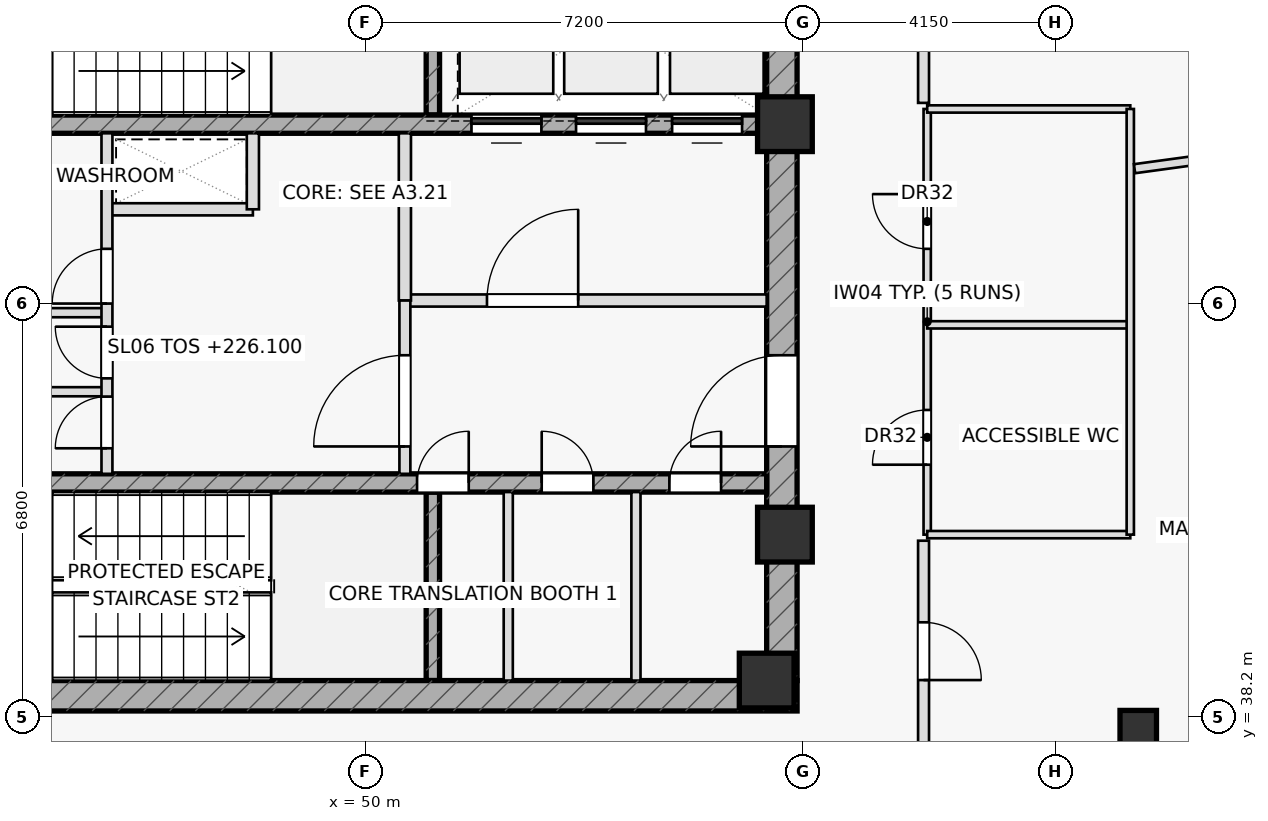
"""IFC4 building model, lengths in metres.
Left out: names, types, materials, properties, quantities, classifications, styles, units other than length and angle.
Written with IfcOpenShell. Run it as: python <this file> out.ifc"""

import sys

from ifc_helpers import new_model, si_unit, direction, frame, frame_2d, origin, origin_2d, place, context, subcontext, project, spatial, rectangle, hollow_rectangle, extrude, element, fill, save


model = new_model("IFC4")
c1 = context("Model", 3, precision=1e-05, world=origin(), true_north=direction((0.0, 1.0)))
c2 = subcontext(c1, "Body", "Model", "MODEL_VIEW")
j1 = project(units=[si_unit("LENGTHUNIT", "METRE"), si_unit("PLANEANGLEUNIT", "RADIAN")], contexts=[c1])
p1 = place(None, origin())
s1 = spatial("IfcSite", under=j1, at=p1, CompositionType="ELEMENT")
p2 = place(p1, origin())
s2 = spatial("IfcBuilding", under=s1, at=p2, CompositionType="ELEMENT")
p3 = place(p2, frame((0.0, 0.0, 226.1)))
s3 = spatial("IfcBuildingStorey", under=s2, at=p3, CompositionType="ELEMENT", Elevation=226.1)
for number, where, z_axis, x_axis in (
    (1, (51.11, 48.1, 0.0), (0.0, 0.0, 1.0), (0.0, 1.0, 0.0)),
    (2, (51.11, 38.8, 0.0), (0.0, 0.0, 1.0), (0.0, 1.0, 0.0)),
):
    element("IfcWall", number, at=place(p3, frame(where, z_axis=z_axis, x_axis=x_axis)), inside=s3, PredefinedType="SHEAR", context=c2, shape_type="SweptSolid", body=[
        extrude(rectangle(XDim=3.1, YDim=0.22, at=frame_2d((1.55, 0.0))), origin(), (0.0, 0.0, 1.0), 3.65),
    ])
p4 = place(p3, frame((42.9, 38.55, 0.0), z_axis=(0.0, 0.0, 1.0), x_axis=(1.0, 0.0, 0.0)))
e3 = element("IfcWall", 3, at=p4, inside=s3, PredefinedType="SHEAR", context=c2, shape_type="SweptSolid", body=[
    extrude(rectangle(XDim=14.2, YDim=0.5, at=frame_2d((7.1, 0.0))), origin(), (0.0, 0.0, 1.0), 3.65),
])
p5 = place(p4, frame((0.78, 0.0, 0.0)))
e4 = element("IfcOpeningElement", 4, at=p5, cuts=e3, PredefinedType="OPENING", context=c2, shape_type="SweptSolid", body=[
    extrude(rectangle(XDim=1.05, YDim=2.2, at=frame_2d((0.525, 1.1))), frame((0.0, 0.26, 0.0), z_axis=(0.0, -1.0, 0.0), x_axis=(1.0, 0.0, 0.0)), (0.0, 0.0, 1.0), 0.52),
])
p6 = place(p3, frame((56.85, 38.8, 0.0), z_axis=(0.0, 0.0, 1.0), x_axis=(0.0, 1.0, 0.0)))
e5 = element("IfcWall", 5, at=p6, inside=s3, PredefinedType="SHEAR", context=c2, shape_type="SweptSolid", body=[
    extrude(rectangle(XDim=12.4, YDim=0.5, at=frame_2d((6.2, 0.0))), origin(), (0.0, 0.0, 1.0), 3.65),
])
p7 = place(p6, frame((3.85, 0.0, 0.0)))
e6 = element("IfcOpeningElement", 6, at=p7, cuts=e5, PredefinedType="OPENING", context=c2, shape_type="SweptSolid", body=[
    extrude(rectangle(XDim=1.5, YDim=2.2, at=frame_2d((0.75, 1.1))), frame((0.0, 0.26, 0.0), z_axis=(0.0, -1.0, 0.0), x_axis=(1.0, 0.0, 0.0)), (0.0, 0.0, 1.0), 0.52),
])
p8 = place(p3, frame((43.4, 47.95, 0.0), z_axis=(0.0, 0.0, 1.0), x_axis=(1.0, 0.0, 0.0)))
e7 = element("IfcWall", 7, at=p8, inside=s3, PredefinedType="SHEAR", context=c2, shape_type="SweptSolid", body=[
    extrude(rectangle(XDim=13.2, YDim=0.3, at=frame_2d((6.6, 0.0))), origin(), (0.0, 0.0, 1.0), 3.65),
])
p9 = place(p8, frame((8.345, 0.0, 0.0)))
e8 = element("IfcOpeningElement", 8, at=p9, cuts=e7, PredefinedType="OPENING", context=c2, shape_type="SweptSolid", body=[
    extrude(rectangle(XDim=1.15, YDim=2.2, at=frame_2d((0.575, 1.1))), frame((0.0, 0.16, 0.0), z_axis=(0.0, -1.0, 0.0), x_axis=(1.0, 0.0, 0.0)), (0.0, 0.0, 1.0), 0.32),
])
p10 = place(p8, frame((10.065, 0.0, 0.0)))
e9 = element("IfcOpeningElement", 9, at=p10, cuts=e7, PredefinedType="OPENING", context=c2, shape_type="SweptSolid", body=[
    extrude(rectangle(XDim=1.15, YDim=2.2, at=frame_2d((0.575, 1.1))), frame((0.0, 0.16, 0.0), z_axis=(0.0, -1.0, 0.0), x_axis=(1.0, 0.0, 0.0)), (0.0, 0.0, 1.0), 0.32),
])
p11 = place(p8, frame((11.645, 0.0, 0.0)))
e10 = element("IfcOpeningElement", 10, at=p11, cuts=e7, PredefinedType="OPENING", context=c2, shape_type="SweptSolid", body=[
    extrude(rectangle(XDim=1.15, YDim=2.2, at=frame_2d((0.575, 1.1))), frame((0.0, 0.16, 0.0), z_axis=(0.0, -1.0, 0.0), x_axis=(1.0, 0.0, 0.0)), (0.0, 0.0, 1.0), 0.32),
])
p12 = place(p3, frame((43.4, 42.05, 0.0), z_axis=(0.0, 0.0, 1.0), x_axis=(1.0, 0.0, 0.0)))
e11 = element("IfcWall", 11, at=p12, inside=s3, PredefinedType="SHEAR", context=c2, shape_type="SweptSolid", body=[
    extrude(rectangle(XDim=13.2, YDim=0.3, at=frame_2d((6.6, 0.0))), origin(), (0.0, 0.0, 1.0), 3.65),
])
p13 = place(p12, frame((7.45, 0.0, 0.0)))
e12 = element("IfcOpeningElement", 12, at=p13, cuts=e11, PredefinedType="OPENING", context=c2, shape_type="SweptSolid", body=[
    extrude(rectangle(XDim=0.85, YDim=2.05, at=frame_2d((0.425, 1.025))), frame((0.0, 0.16, 0.0), z_axis=(0.0, -1.0, 0.0), x_axis=(1.0, 0.0, 0.0)), (0.0, 0.0, 1.0), 0.32),
])
p14 = place(p12, frame((9.5, 0.0, 0.0)))
e13 = element("IfcOpeningElement", 13, at=p14, cuts=e11, PredefinedType="OPENING", context=c2, shape_type="SweptSolid", body=[
    extrude(rectangle(XDim=0.85, YDim=2.05, at=frame_2d((0.425, 1.025))), frame((0.0, 0.16, 0.0), z_axis=(0.0, -1.0, 0.0), x_axis=(1.0, 0.0, 0.0)), (0.0, 0.0, 1.0), 0.32),
])
p15 = place(p12, frame((11.6, 0.0, 0.0)))
e14 = element("IfcOpeningElement", 14, at=p15, cuts=e11, PredefinedType="OPENING", context=c2, shape_type="SweptSolid", body=[
    extrude(rectangle(XDim=0.85, YDim=2.05, at=frame_2d((0.425, 1.025))), frame((0.0, 0.16, 0.0), z_axis=(0.0, -1.0, 0.0), x_axis=(1.0, 0.0, 0.0)), (0.0, 0.0, 1.0), 0.32),
])
for number, where, z_axis, x_axis in (
    (15, (56.9, 47.95, 0.0), (0.0, 0.0, 1.0), (1.0, 0.0, 0.0)),
    (16, (56.9, 41.2, 0.0), (0.0, 0.0, 1.0), (1.0, 0.0, 0.0)),
    (17, (56.6, 38.8, 0.0), (0.0, 0.0, 1.0), (1.0, 0.0, 0.0)),
):
    element("IfcColumn", number, at=place(p3, frame(where, z_axis=z_axis, x_axis=x_axis)), inside=s3, PredefinedType="COLUMN", context=c2, shape_type="SweptSolid", body=[
        extrude(rectangle(XDim=0.9, YDim=0.9, at=origin_2d()), origin(), (0.0, 0.0, 1.0), 3.65),
    ])
p16 = place(p3, frame((62.711, 38.009, 0.0), z_axis=(0.0, 0.0, 1.0), x_axis=(1.0, 0.0, 0.0)))
e18 = element("IfcColumn", 18, at=p16, inside=s3, PredefinedType="COLUMN", context=c2, shape_type="SweptSolid", body=[
    extrude(hollow_rectangle(XDim=0.6, YDim=0.6, WallThickness=0.036, at=origin_2d()), origin(), (0.0, 0.0, 1.0), 3.65),
])
p17 = place(p3, frame((45.75, 46.55, 0.0), z_axis=(0.0, 0.0, 1.0), x_axis=(1.0, 0.0, 0.0)))
e19 = element("IfcWall", 19, at=p17, inside=s3, PredefinedType="PARTITIONING", context=c2, shape_type="SweptSolid", body=[
    extrude(rectangle(XDim=2.4, YDim=0.2, at=frame_2d((1.2, 0.0))), origin(), (0.0, 0.0, 1.0), 3.65),
])
p18 = place(p3, frame((48.15, 46.55, 0.0), z_axis=(0.0, 0.0, 1.0), x_axis=(0.0, 1.0, 0.0)))
e20 = element("IfcWall", 20, at=p18, inside=s3, PredefinedType="PARTITIONING", context=c2, shape_type="SweptSolid", body=[
    extrude(rectangle(XDim=1.25, YDim=0.2, at=frame_2d((0.625, 0.0))), origin(), (0.0, 0.0, 1.0), 3.65),
])
p19 = place(p3, frame((50.65, 45.05, 0.0), z_axis=(0.0, 0.0, 1.0), x_axis=(1.0, 0.0, 0.0)))
e21 = element("IfcWall", 21, at=p19, inside=s3, PredefinedType="PARTITIONING", context=c2, shape_type="SweptSolid", body=[
    extrude(rectangle(XDim=5.95, YDim=0.2, at=frame_2d((2.975, 0.0))), origin(), (0.0, 0.0, 1.0), 3.65),
])
p20 = place(p19, frame((1.35, 0.0, 0.0)))
e22 = element("IfcOpeningElement", 22, at=p20, cuts=e21, PredefinedType="OPENING", context=c2, shape_type="SweptSolid", body=[
    extrude(rectangle(XDim=1.5, YDim=2.2, at=frame_2d((0.75, 1.1))), frame((0.0, 0.11, 0.0), z_axis=(0.0, -1.0, 0.0), x_axis=(1.0, 0.0, 0.0)), (0.0, 0.0, 1.0), 0.22),
])
p21 = place(p3, frame((50.65, 45.05, 0.0), z_axis=(0.0, 0.0, 1.0), x_axis=(0.0, 1.0, 0.0)))
e23 = element("IfcWall", 23, at=p21, inside=s3, PredefinedType="PARTITIONING", context=c2, shape_type="SweptSolid", body=[
    extrude(rectangle(XDim=2.75, YDim=0.2, at=frame_2d((1.375, 0.0))), origin(), (0.0, 0.0, 1.0), 3.65),
])
p22 = place(p3, frame((50.65, 42.2, 0.0), z_axis=(0.0, 0.0, 1.0), x_axis=(0.0, 1.0, 0.0)))
e24 = element("IfcWall", 24, at=p22, inside=s3, PredefinedType="PARTITIONING", context=c2, shape_type="SweptSolid", body=[
    extrude(rectangle(XDim=2.85, YDim=0.18, at=frame_2d((1.425, 0.0))), origin(), (0.0, 0.0, 1.0), 3.65),
])
p23 = place(p22, frame((0.45, 0.0, 0.0)))
e25 = element("IfcOpeningElement", 25, at=p23, cuts=e24, PredefinedType="OPENING", context=c2, shape_type="SweptSolid", body=[
    extrude(rectangle(XDim=1.5, YDim=2.2, at=frame_2d((0.75, 1.1))), frame((0.0, 0.1, 0.0), z_axis=(0.0, -1.0, 0.0), x_axis=(1.0, 0.0, 0.0)), (0.0, 0.0, 1.0), 0.2),
])
for number, where, z_axis, x_axis in (
    (26, (52.35, 38.8, 0.0), (0.0, 0.0, 1.0), (0.0, 1.0, 0.0)),
    (27, (54.45, 38.8, 0.0), (0.0, 0.0, 1.0), (0.0, 1.0, 0.0)),
):
    element("IfcWall", number, at=place(p3, frame(where, z_axis=z_axis, x_axis=x_axis)), inside=s3, PredefinedType="PARTITIONING", context=c2, shape_type="SweptSolid", body=[
        extrude(rectangle(XDim=3.1, YDim=0.15, at=frame_2d((1.55, 0.0))), origin(), (0.0, 0.0, 1.0), 3.65),
    ])
for number, where, z_axis, x_axis in (
    (28, (43.4, 43.55, 0.0), (0.0, 0.0, 1.0), (1.0, 0.0, 0.0)),
    (29, (43.4, 44.85, 0.0), (0.0, 0.0, 1.0), (1.0, 0.0, 0.0)),
):
    element("IfcWall", number, at=place(p3, frame(where, z_axis=z_axis, x_axis=x_axis)), inside=s3, PredefinedType="PARTITIONING", context=c2, shape_type="SweptSolid", body=[
        extrude(rectangle(XDim=2.35, YDim=0.15, at=frame_2d((1.175, 0.0))), origin(), (0.0, 0.0, 1.0), 3.65),
    ])
p24 = place(p3, frame((45.75, 42.2, 0.0), z_axis=(0.0, 0.0, 1.0), x_axis=(0.0, 1.0, 0.0)))
e30 = element("IfcWall", 30, at=p24, inside=s3, PredefinedType="PARTITIONING", context=c2, shape_type="SweptSolid", body=[
    extrude(rectangle(XDim=5.6, YDim=0.18, at=frame_2d((2.8, 0.0))), origin(), (0.0, 0.0, 1.0), 3.65),
])
p25 = place(p24, frame((0.42, 0.0, 0.0)))
e31 = element("IfcOpeningElement", 31, at=p25, cuts=e30, PredefinedType="OPENING", context=c2, shape_type="SweptSolid", body=[
    extrude(rectangle(XDim=0.85, YDim=2.05, at=frame_2d((0.425, 1.025))), frame((0.0, 0.1, 0.0), z_axis=(0.0, -1.0, 0.0), x_axis=(1.0, 0.0, 0.0)), (0.0, 0.0, 1.0), 0.2),
])
p26 = place(p24, frame((1.57, 0.0, 0.0)))
e32 = element("IfcOpeningElement", 32, at=p26, cuts=e30, PredefinedType="OPENING", context=c2, shape_type="SweptSolid", body=[
    extrude(rectangle(XDim=0.85, YDim=2.05, at=frame_2d((0.425, 1.025))), frame((0.0, 0.1, 0.0), z_axis=(0.0, -1.0, 0.0), x_axis=(1.0, 0.0, 0.0)), (0.0, 0.0, 1.0), 0.2),
])
p27 = place(p24, frame((2.8, 0.0, 0.0)))
e33 = element("IfcOpeningElement", 33, at=p27, cuts=e30, PredefinedType="OPENING", context=c2, shape_type="SweptSolid", body=[
    extrude(rectangle(XDim=0.9, YDim=2.05, at=frame_2d((0.45, 1.025))), frame((0.0, 0.1, 0.0), z_axis=(0.0, -1.0, 0.0), x_axis=(1.0, 0.0, 0.0)), (0.0, 0.0, 1.0), 0.2),
])
p28 = place(p3, frame((59.24, 41.2, 0.0), z_axis=(0.0, 0.0, 1.0), x_axis=(0.0, 1.0, 0.0)))
e34 = element("IfcWall", 34, at=p28, inside=s3, PredefinedType="PARTITIONING", context=c2, shape_type="SweptSolid", body=[
    extrude(rectangle(XDim=7.0, YDim=0.12, at=frame_2d((3.5, 0.0))), origin(), (0.0, 0.0, 1.0), 3.65),
])
p29 = place(p28, frame((1.15, 0.0, 0.0)))
e35 = element("IfcOpeningElement", 35, at=p29, cuts=e34, PredefinedType="OPENING", context=c2, shape_type="SweptSolid", body=[
    extrude(rectangle(XDim=0.9, YDim=2.05, at=frame_2d((0.45, 1.025))), frame((0.0, 0.07, 0.0), z_axis=(0.0, -1.0, 0.0), x_axis=(1.0, 0.0, 0.0)), (0.0, 0.0, 1.0), 0.14),
])
p30 = place(p28, frame((4.7, 0.0, 0.0)))
e36 = element("IfcOpeningElement", 36, at=p30, cuts=e34, PredefinedType="OPENING", context=c2, shape_type="SweptSolid", body=[
    extrude(rectangle(XDim=0.9, YDim=2.05, at=frame_2d((0.45, 1.025))), frame((0.0, 0.07, 0.0), z_axis=(0.0, -1.0, 0.0), x_axis=(1.0, 0.0, 0.0)), (0.0, 0.0, 1.0), 0.14),
])
p31 = place(p3, frame((59.24, 41.2, 0.0), z_axis=(0.0, 0.0, 1.0), x_axis=(1.0, 0.0, 0.0)))
e37 = element("IfcWall", 37, at=p31, inside=s3, PredefinedType="PARTITIONING", context=c2, shape_type="SweptSolid", body=[
    extrude(rectangle(XDim=3.34, YDim=0.12, at=frame_2d((1.67, 0.0))), origin(), (0.0, 0.0, 1.0), 3.025),
])
for number, where, z_axis, x_axis in (
    (38, (59.24, 44.65, 0.0), (0.0, 0.0, 1.0), (1.0, 0.0, 0.0)),
    (39, (59.24, 48.2, 0.0), (0.0, 0.0, 1.0), (1.0, 0.0, 0.0)),
):
    element("IfcWall", number, at=place(p3, frame(where, z_axis=z_axis, x_axis=x_axis)), inside=s3, PredefinedType="PARTITIONING", context=c2, shape_type="SweptSolid", body=[
        extrude(rectangle(XDim=3.34, YDim=0.12, at=frame_2d((1.67, 0.0))), origin(), (0.0, 0.0, 1.0), 3.65),
    ])
p32 = place(p3, frame((62.58, 41.2, 0.0), z_axis=(0.0, 0.0, 1.0), x_axis=(0.0, 1.0, 0.0)))
e40 = element("IfcWall", 40, at=p32, inside=s3, PredefinedType="PARTITIONING", context=c2, shape_type="SweptSolid", body=[
    extrude(rectangle(XDim=7.0, YDim=0.12, at=frame_2d((3.5, 0.0))), origin(), (0.0, 0.0, 1.0), 3.325),
])
p33 = place(p3, frame((59.18, 37.752, 0.0), z_axis=(0.0, 0.0, 1.0), x_axis=(0.869856049735, -0.49330563826, 0.0)))
e41 = element("IfcWall", 41, at=p33, inside=s3, PredefinedType="PARTITIONING", context=c2, shape_type="SweptSolid", body=[
    extrude(rectangle(XDim=5.359, YDim=0.15, at=frame_2d((2.68, 0.0))), origin(), (0.0, 0.0, 1.0), 3.135),
])
p34 = place(p3, frame((62.65, 47.218, 0.0), z_axis=(0.0, 0.0, 1.0), x_axis=(0.990815618687, 0.135219857145, 0.0)))
e42 = element("IfcWall", 42, at=p34, inside=s3, PredefinedType="PARTITIONING", context=c2, shape_type="SweptSolid", body=[
    extrude(rectangle(XDim=9.909, YDim=0.15, at=frame_2d((4.954, 0.0))), origin(), (0.0, 0.0, 1.0), 3.135),
])
p35 = place(p3, frame((59.18, 53.83, 0.0), z_axis=(0.0, 0.0, 1.0), x_axis=(0.0, -1.0, 0.0)))
e43 = element("IfcWall", 43, at=p35, inside=s3, PredefinedType="PARTITIONING", context=c2, shape_type="SweptSolid", body=[
    extrude(rectangle(XDim=5.53, YDim=0.18, at=frame_2d((2.765, 0.0))), origin(), (0.0, 0.0, 1.0), 3.65),
])
p36 = place(p35, frame((2.709, 0.0, 0.0)))
e44 = element("IfcOpeningElement", 44, at=p36, cuts=e43, PredefinedType="OPENING", context=c2, shape_type="SweptSolid", body=[
    extrude(rectangle(XDim=0.95, YDim=2.05, at=frame_2d((0.475, 1.025))), frame((0.0, 0.1, 0.0), z_axis=(0.0, -1.0, 0.0), x_axis=(1.0, 0.0, 0.0)), (0.0, 0.0, 1.0), 0.2),
])
p37 = place(p3, frame((59.18, 41.1, 0.0), z_axis=(0.0, 0.0, 1.0), x_axis=(0.0, -1.0, 0.0)))
e45 = element("IfcWall", 45, at=p37, inside=s3, PredefinedType="PARTITIONING", context=c2, shape_type="SweptSolid", body=[
    extrude(rectangle(XDim=4.93, YDim=0.18, at=frame_2d((2.465, 0.0))), origin(), (0.0, 0.0, 1.0), 3.325),
])
p38 = place(p37, frame((1.342, 0.0, 0.0)))
e46 = element("IfcOpeningElement", 46, at=p38, cuts=e45, PredefinedType="OPENING", context=c2, shape_type="SweptSolid", body=[
    extrude(rectangle(XDim=0.95, YDim=2.05, at=frame_2d((0.475, 1.025))), frame((0.0, 0.1, 0.0), z_axis=(0.0, -1.0, 0.0), x_axis=(1.0, 0.0, 0.0)), (0.0, 0.0, 1.0), 0.2),
])
p39 = place(p7, origin())
e47 = element("IfcDoor", 47, at=p39, inside=s3, OperationType="SINGLE_SWING_LEFT", PredefinedType="DOOR", context=c2, shape_type="SweptSolid", body=[
    extrude(rectangle(XDim=1.5, YDim=2.2, at=frame_2d((0.75, 1.1))), frame((0.0, 0.025, 0.0), z_axis=(0.0, -1.0, 0.0), x_axis=(1.0, 0.0, 0.0)), (0.0, 0.0, 1.0), 0.05),
])
fill(e6, e47)
p40 = place(p20, origin())
e48 = element("IfcDoor", 48, at=p40, inside=s3, OperationType="SINGLE_SWING_RIGHT", PredefinedType="DOOR", context=c2, shape_type="SweptSolid", body=[
    extrude(rectangle(XDim=1.5, YDim=2.2, at=frame_2d((0.75, 1.1))), frame((0.0, 0.025, 0.0), z_axis=(0.0, -1.0, 0.0), x_axis=(1.0, 0.0, 0.0)), (0.0, 0.0, 1.0), 0.05),
])
fill(e22, e48)
p41 = place(p23, origin())
e49 = element("IfcDoor", 49, at=p41, inside=s3, OperationType="SINGLE_SWING_LEFT", PredefinedType="DOOR", context=c2, shape_type="SweptSolid", body=[
    extrude(rectangle(XDim=1.5, YDim=2.2, at=frame_2d((0.75, 1.1))), frame((0.0, 0.025, 0.0), z_axis=(0.0, -1.0, 0.0), x_axis=(1.0, 0.0, 0.0)), (0.0, 0.0, 1.0), 0.05),
])
fill(e25, e49)
p42 = place(p13, origin())
e50 = element("IfcDoor", 50, at=p42, inside=s3, OperationType="SINGLE_SWING_RIGHT", PredefinedType="DOOR", context=c2, shape_type="SweptSolid", body=[
    extrude(rectangle(XDim=0.85, YDim=2.05, at=frame_2d((0.425, 1.025))), frame((0.0, 0.025, 0.0), z_axis=(0.0, -1.0, 0.0), x_axis=(1.0, 0.0, 0.0)), (0.0, 0.0, 1.0), 0.05),
])
fill(e12, e50)
p43 = place(p14, origin())
e51 = element("IfcDoor", 51, at=p43, inside=s3, OperationType="SINGLE_SWING_LEFT", PredefinedType="DOOR", context=c2, shape_type="SweptSolid", body=[
    extrude(rectangle(XDim=0.85, YDim=2.05, at=frame_2d((0.425, 1.025))), frame((0.0, 0.025, 0.0), z_axis=(0.0, -1.0, 0.0), x_axis=(1.0, 0.0, 0.0)), (0.0, 0.0, 1.0), 0.05),
])
fill(e13, e51)
p44 = place(p15, origin())
e52 = element("IfcDoor", 52, at=p44, inside=s3, OperationType="SINGLE_SWING_RIGHT", PredefinedType="DOOR", context=c2, shape_type="SweptSolid", body=[
    extrude(rectangle(XDim=0.85, YDim=2.05, at=frame_2d((0.425, 1.025))), frame((0.0, 0.025, 0.0), z_axis=(0.0, -1.0, 0.0), x_axis=(1.0, 0.0, 0.0)), (0.0, 0.0, 1.0), 0.05),
])
fill(e14, e52)
p45 = place(p25, origin())
e53 = element("IfcDoor", 53, at=p45, inside=s3, OperationType="SINGLE_SWING_LEFT", PredefinedType="DOOR", context=c2, shape_type="SweptSolid", body=[
    extrude(rectangle(XDim=0.85, YDim=2.05, at=frame_2d((0.425, 1.025))), frame((0.0, 0.025, 0.0), z_axis=(0.0, -1.0, 0.0), x_axis=(1.0, 0.0, 0.0)), (0.0, 0.0, 1.0), 0.05),
])
fill(e31, e53)
p46 = place(p26, origin())
e54 = element("IfcDoor", 54, at=p46, inside=s3, OperationType="SINGLE_SWING_RIGHT", PredefinedType="DOOR", context=c2, shape_type="SweptSolid", body=[
    extrude(rectangle(XDim=0.85, YDim=2.05, at=frame_2d((0.425, 1.025))), frame((0.0, 0.025, 0.0), z_axis=(0.0, -1.0, 0.0), x_axis=(1.0, 0.0, 0.0)), (0.0, 0.0, 1.0), 0.05),
])
fill(e32, e54)
p47 = place(p27, origin())
e55 = element("IfcDoor", 55, at=p47, inside=s3, OperationType="SINGLE_SWING_LEFT", PredefinedType="DOOR", context=c2, shape_type="SweptSolid", body=[
    extrude(rectangle(XDim=0.9, YDim=2.05, at=frame_2d((0.45, 1.025))), frame((0.0, 0.025, 0.0), z_axis=(0.0, -1.0, 0.0), x_axis=(1.0, 0.0, 0.0)), (0.0, 0.0, 1.0), 0.05),
])
fill(e33, e55)
p48 = place(p29, origin())
e56 = element("IfcDoor", 56, at=p48, inside=s3, OperationType="SINGLE_SWING_LEFT", PredefinedType="DOOR", context=c2, shape_type="SweptSolid", body=[
    extrude(rectangle(XDim=0.9, YDim=2.05, at=frame_2d((0.45, 1.025))), frame((0.0, 0.025, 0.0), z_axis=(0.0, -1.0, 0.0), x_axis=(1.0, 0.0, 0.0)), (0.0, 0.0, 1.0), 0.05),
])
fill(e35, e56)
p49 = place(p30, origin())
e57 = element("IfcDoor", 57, at=p49, inside=s3, OperationType="SINGLE_SWING_RIGHT", PredefinedType="DOOR", context=c2, shape_type="SweptSolid", body=[
    extrude(rectangle(XDim=0.9, YDim=2.05, at=frame_2d((0.45, 1.025))), frame((0.0, 0.025, 0.0), z_axis=(0.0, -1.0, 0.0), x_axis=(1.0, 0.0, 0.0)), (0.0, 0.0, 1.0), 0.05),
])
fill(e36, e57)
p50 = place(p38, origin())
e58 = element("IfcDoor", 58, at=p50, inside=s3, OperationType="SINGLE_SWING_RIGHT", PredefinedType="DOOR", context=c2, shape_type="SweptSolid", body=[
    extrude(rectangle(XDim=0.95, YDim=2.05, at=frame_2d((0.475, 1.025))), frame((0.0, 0.025, 0.0), z_axis=(0.0, -1.0, 0.0), x_axis=(1.0, 0.0, 0.0)), (0.0, 0.0, 1.0), 0.05),
])
fill(e46, e58)
p51 = place(p9, origin())
e59 = element("IfcDoor", 59, at=p51, inside=s3, OperationType="SLIDING_TO_LEFT", PredefinedType="DOOR", context=c2, shape_type="SweptSolid", body=[
    extrude(rectangle(XDim=1.15, YDim=2.2, at=frame_2d((0.575, 1.1))), frame((0.0, 0.025, 0.0), z_axis=(0.0, -1.0, 0.0), x_axis=(1.0, 0.0, 0.0)), (0.0, 0.0, 1.0), 0.05),
])
fill(e8, e59)
p52 = place(p10, origin())
e60 = element("IfcDoor", 60, at=p52, inside=s3, OperationType="SLIDING_TO_LEFT", PredefinedType="DOOR", context=c2, shape_type="SweptSolid", body=[
    extrude(rectangle(XDim=1.15, YDim=2.2, at=frame_2d((0.575, 1.1))), frame((0.0, 0.025, 0.0), z_axis=(0.0, -1.0, 0.0), x_axis=(1.0, 0.0, 0.0)), (0.0, 0.0, 1.0), 0.05),
])
fill(e9, e60)
p53 = place(p11, origin())
e61 = element("IfcDoor", 61, at=p53, inside=s3, OperationType="SLIDING_TO_LEFT", PredefinedType="DOOR", context=c2, shape_type="SweptSolid", body=[
    extrude(rectangle(XDim=1.15, YDim=2.2, at=frame_2d((0.575, 1.1))), frame((0.0, 0.025, 0.0), z_axis=(0.0, -1.0, 0.0), x_axis=(1.0, 0.0, 0.0)), (0.0, 0.0, 1.0), 0.05),
])
fill(e10, e61)
save(model, sys.argv[1])
